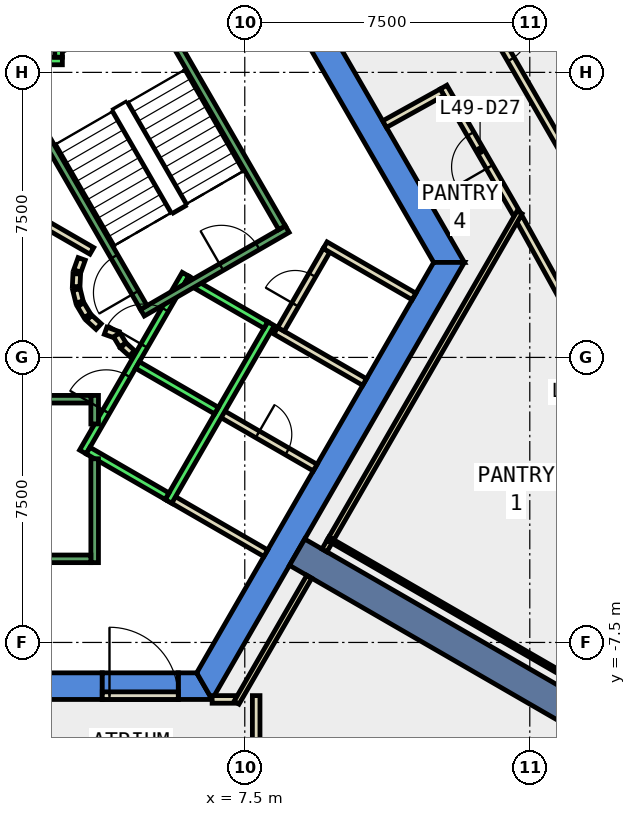
"""IFC4 building model, lengths in metres.
Left out: names, types, materials, properties, quantities, classifications, styles, units other than length and angle.
Written with IfcOpenShell. Run it as: python <this file> out.ifc"""

import sys

from ifc_helpers import new_model, si_unit, direction, frame, frame_2d, origin, place, context, subcontext, project, spatial, polyline, rectangle, outline, extrude, element, fill, save


model = new_model("IFC4")
c1 = context("Model", 3, precision=1e-05, world=origin(), true_north=direction((0.0, 1.0)))
c2 = subcontext(c1, "Body", "Model", "MODEL_VIEW")
j1 = project(units=[si_unit("LENGTHUNIT", "METRE"), si_unit("PLANEANGLEUNIT", "RADIAN")], contexts=[c1])
p1 = place(None, origin())
s1 = spatial("IfcSite", under=j1, at=p1, CompositionType="ELEMENT")
p2 = place(p1, origin())
s2 = spatial("IfcBuilding", under=s1, at=p2, CompositionType="ELEMENT")
p3 = place(p2, frame((0.0, 0.0, 219.2)))
s3 = spatial("IfcBuildingStorey", under=s2, at=p3, CompositionType="ELEMENT", Elevation=219.2)
p4 = place(p3, frame((0.0, 0.0, -0.4)))
e1 = element("IfcWall", 1, at=p4, inside=s3, PredefinedType="SHEAR", context=c2, shape_type="SweptSolid", body=[
    extrude(outline(polyline([(8.084, 11.498), (7.478, 11.148), (12.471, 2.5), (13.279, 2.5), (8.084, 11.498)])), origin(), (0.0, 0.0, 1.0), 4.2),
])
p5 = place(p3, frame((0.0, 0.0, -0.4)))
e2 = element("IfcWall", 2, at=p5, inside=s3, PredefinedType="SHEAR", context=c2, shape_type="SweptSolid", body=[
    extrude(outline(polyline([(3.75, -9.0), (3.75, -8.3), (-6.235, -8.3), (-6.64, -9.0), (3.75, -9.0)])), origin(), (0.0, 0.0, 1.0), 4.2),
])
p6 = place(p3, frame((0.0, 0.0, -0.4)))
e3 = element("IfcWall", 3, at=p6, inside=s3, PredefinedType="SHEAR", context=c2, shape_type="SweptSolid", body=[
    extrude(outline(polyline([(5.75, -8.3), (5.75, -9.0), (6.64, -9.0), (6.235, -8.3), (5.75, -8.3)])), origin(), (0.0, 0.0, 1.0), 4.2),
])
p7 = place(p3, frame((0.0, 0.0, 3.6)))
e4 = element("IfcWall", 4, at=p7, inside=s3, PredefinedType="SHEAR", context=c2, shape_type="SweptSolid", body=[
    extrude(outline(polyline([(5.75, -9.0), (5.75, -8.3), (3.75, -8.3), (3.75, -9.0), (5.75, -9.0)])), origin(), (0.0, 0.0, 1.0), 0.2),
])
p8 = place(p3, frame((0.0, 0.0, -0.4)))
e5 = element("IfcWall", 5, at=p8, inside=s3, PredefinedType="SHEAR", context=c2, shape_type="SweptSolid", body=[
    extrude(outline(polyline([(6.64, -9.0), (13.279, 2.5), (12.471, 2.5), (6.235, -8.3), (6.64, -9.0)])), origin(), (0.0, 0.0, 1.0), 4.2),
])
p9 = place(p3, frame((8.877, -5.125, -0.4), z_axis=(0.0, 0.0, 1.0), x_axis=(0.866017533419, -0.500013631625, 0.0)))
e6 = element("IfcWall", 6, at=p9, inside=s3, PredefinedType="SHEAR", context=c2, shape_type="SweptSolid", body=[
    extrude(rectangle(XDim=9.0, YDim=0.8, at=frame_2d((4.5, 0.0))), origin(), (0.0, 0.0, 1.0), 4.2),
])
p10 = place(p3, frame((14.652, 3.783, 0.0), z_axis=(0.0, 0.0, 1.0), x_axis=(-0.499821427992, 0.866128477837, 0.0)))
e7 = element("IfcWall", 7, at=p10, inside=s3, PredefinedType="PARTITIONING", context=c2, shape_type="SweptSolid", body=[
    extrude(rectangle(XDim=3.844, YDim=0.2, at=frame_2d((1.922, 0.0))), origin(), (0.0, 0.0, 1.0), 3.8),
])
p11 = place(p10, frame((1.421, 0.0, 0.0)))
e8 = element("IfcOpeningElement", 8, at=p11, cuts=e7, PredefinedType="OPENING", context=c2, shape_type="SweptSolid", body=[
    extrude(rectangle(XDim=1.0, YDim=2.1, at=frame_2d((0.5, 1.05))), frame((0.0, 0.11, 0.0), z_axis=(0.0, -1.0, 0.0), x_axis=(1.0, 0.0, 0.0)), (0.0, 0.0, 1.0), 0.22),
])
p12 = place(p3, frame((12.693, 6.976, 0.0), z_axis=(0.0, 0.0, 1.0), x_axis=(-0.874908151187, -0.484288887944, 0.0)))
e9 = element("IfcWall", 9, at=p12, inside=s3, PredefinedType="PARTITIONING", context=c2, shape_type="SweptSolid", body=[
    extrude(rectangle(XDim=1.731, YDim=0.2, at=frame_2d((0.865, 0.0))), origin(), (0.0, 0.0, 1.0), 3.8),
])
p13 = place(p3, frame((18.574, -3.303, 0.0), z_axis=(0.0, 0.0, 1.0), x_axis=(-0.484239190765, 0.874935658279, 0.0)))
e10 = element("IfcWall", 10, at=p13, inside=s3, PredefinedType="PARTITIONING", context=c2, shape_type="SweptSolid", body=[
    extrude(rectangle(XDim=7.963, YDim=0.2, at=frame_2d((3.981, 0.0))), origin(), (0.0, 0.0, 1.0), 3.8),
])
p14 = place(p13, frame((3.482, 0.0, 0.0)))
e11 = element("IfcOpeningElement", 11, at=p14, cuts=e10, PredefinedType="OPENING", context=c2, shape_type="SweptSolid", body=[
    extrude(rectangle(XDim=1.0, YDim=2.1, at=frame_2d((0.5, 1.05))), frame((0.0, 0.11, 0.0), z_axis=(0.0, -1.0, 0.0), x_axis=(1.0, 0.0, 0.0)), (0.0, 0.0, 1.0), 0.22),
])
p15 = place(p3, frame((12.202, 11.828, 0.0), z_axis=(0.0, 0.0, 1.0), x_axis=(0.499919823193, -0.866071688937, 0.0)))
e12 = element("IfcWall", 12, at=p15, inside=s3, PredefinedType="PARTITIONING", context=c2, shape_type="SweptSolid", body=[
    extrude(rectangle(XDim=8.209, YDim=0.2, at=frame_2d((4.104, 0.0))), origin(), (0.0, 0.0, 1.0), 3.8),
])
p16 = place(p15, frame((3.604, 0.0, 0.0)))
e13 = element("IfcOpeningElement", 13, at=p16, cuts=e12, PredefinedType="OPENING", context=c2, shape_type="SweptSolid", body=[
    extrude(rectangle(XDim=1.0, YDim=2.1, at=frame_2d((0.5, 1.05))), frame((0.0, 0.11, 0.0), z_axis=(0.0, -1.0, 0.0), x_axis=(1.0, 0.0, 0.0)), (0.0, 0.0, 1.0), 0.22),
])
p17 = place(p3, frame((8.053, -5.152, 0.0), z_axis=(0.0, 0.0, 1.0), x_axis=(-0.865808344015, 0.500375770231, 0.0)))
e14 = element("IfcWall", 14, at=p17, inside=s3, PredefinedType="PARTITIONING", context=c2, shape_type="SweptSolid", body=[
    extrude(rectangle(XDim=2.9, YDim=0.2, at=frame_2d((1.45, 0.0))), origin(), (0.0, 0.0, 1.0), 3.8),
])
p18 = place(p3, frame((6.841, -1.451, 0.0), z_axis=(0.0, 0.0, 1.0), x_axis=(0.866220623736, -0.499661716578, 0.0)))
e15 = element("IfcWall", 15, at=p18, inside=s3, PredefinedType="PARTITIONING", context=c2, shape_type="SweptSolid", body=[
    extrude(rectangle(XDim=2.9, YDim=0.2, at=frame_2d((1.45, 0.0))), origin(), (0.0, 0.0, 1.0), 3.8),
])
p19 = place(p18, frame((1.15, 0.0, 0.0)))
e16 = element("IfcOpeningElement", 16, at=p19, cuts=e15, PredefinedType="OPENING", context=c2, shape_type="SweptSolid", body=[
    extrude(rectangle(XDim=0.9, YDim=2.1, at=frame_2d((0.45, 1.05))), frame((0.0, 0.11, 0.0), z_axis=(0.0, -1.0, 0.0), x_axis=(1.0, 0.0, 0.0)), (0.0, 0.0, 1.0), 0.22),
])
p20 = place(p3, frame((10.653, -0.648, 0.0), z_axis=(0.0, 0.0, 1.0), x_axis=(-0.866036505625, 0.499980770555, 0.0)))
e17 = element("IfcWall", 17, at=p20, inside=s3, PredefinedType="PARTITIONING", context=c2, shape_type="SweptSolid", body=[
    extrude(rectangle(XDim=2.7, YDim=0.2, at=frame_2d((1.35, 0.0))), origin(), (0.0, 0.0, 1.0), 3.8),
])
p21 = place(p3, frame((8.451, 0.738, 0.0), z_axis=(0.0, 0.0, 1.0), x_axis=(0.499913221443, 0.866075499611, 0.0)))
e18 = element("IfcWall", 18, at=p21, inside=s3, PredefinedType="PARTITIONING", context=c2, shape_type="SweptSolid", body=[
    extrude(rectangle(XDim=2.4, YDim=0.2, at=frame_2d((1.2, 0.0))), origin(), (0.0, 0.0, 1.0), 3.8),
])
p22 = place(p21, frame((0.75, 0.0, 0.0)))
e19 = element("IfcOpeningElement", 19, at=p22, cuts=e18, PredefinedType="OPENING", context=c2, shape_type="SweptSolid", body=[
    extrude(rectangle(XDim=0.9, YDim=2.1, at=frame_2d((0.45, 1.05))), frame((0.0, 0.11, 0.0), z_axis=(0.0, -1.0, 0.0), x_axis=(1.0, 0.0, 0.0)), (0.0, 0.0, 1.0), 0.22),
])
p23 = place(p3, frame((9.615, 2.953, 0.0), z_axis=(0.0, 0.0, 1.0), x_axis=(0.866013897511, -0.50001992892, 0.0)))
e20 = element("IfcWall", 20, at=p23, inside=s3, PredefinedType="PARTITIONING", context=c2, shape_type="SweptSolid", body=[
    extrude(rectangle(XDim=2.7, YDim=0.2, at=frame_2d((1.35, 0.0))), origin(), (0.0, 0.0, 1.0), 3.8),
])
p24 = place(p3, frame((6.641, -8.999, 0.0), z_axis=(0.0, 0.0, 1.0), x_axis=(1.0, 0.0, 0.0)))
e21 = element("IfcWall", 21, at=p24, inside=s3, PredefinedType="PARTITIONING", context=c2, shape_type="SweptSolid", body=[
    extrude(rectangle(XDim=0.617, YDim=0.2, at=frame_2d((0.309, 0.0))), origin(), (0.0, 0.0, 1.0), 3.8),
])
p25 = place(p3, frame((7.283, -9.086, 0.0), z_axis=(0.0, 0.0, 1.0), x_axis=(0.500035303972, 0.866005020067, 0.0)))
e22 = element("IfcWall", 22, at=p25, inside=s3, PredefinedType="PARTITIONING", context=c2, shape_type="SweptSolid", body=[
    extrude(rectangle(XDim=3.828, YDim=0.15, at=frame_2d((1.914, 0.0))), origin(), (0.0, 0.0, 1.0), 3.8),
])
p26 = place(p3, frame((9.779, -4.762, 0.0), z_axis=(0.0, 0.0, 1.0), x_axis=(0.499990552429, 0.866030858274, 0.0)))
e23 = element("IfcWall", 23, at=p26, inside=s3, PredefinedType="PARTITIONING", context=c2, shape_type="SweptSolid", body=[
    extrude(rectangle(XDim=9.906, YDim=0.15, at=frame_2d((4.953, 0.0))), origin(), (0.0, 0.0, 1.0), 3.8),
])
p27 = place(p3, frame((1.866, 3.732, 0.0), z_axis=(0.0, 0.0, 1.0), x_axis=(0.866043361281, -0.499968895414, 0.0)))
e24 = element("IfcWall", 24, at=p27, inside=s3, PredefinedType="PARTITIONING", context=c2, shape_type="SweptSolid", body=[
    extrude(rectangle(XDim=1.858, YDim=0.2, at=frame_2d((0.929, 0.0))), origin(), (0.0, 0.0, 1.0), 3.8),
])
p28 = place(p3, frame((3.208, 2.592, 0.0), z_axis=(0.0, 0.0, 1.0), x_axis=(-0.337388820924, -0.941365382578, 0.0)))
e25 = element("IfcWall", 25, at=p28, inside=s3, PredefinedType="PARTITIONING", context=c2, shape_type="SweptSolid", body=[
    extrude(rectangle(XDim=0.338, YDim=0.2, at=frame_2d((0.169, 0.0))), origin(), (0.0, 0.0, 1.0), 3.8),
])
p29 = place(p3, frame((3.079, 2.199, 0.0), z_axis=(0.0, 0.0, 1.0), x_axis=(-0.047771483479, -0.998858290933, 0.0)))
e26 = element("IfcWall", 26, at=p29, inside=s3, PredefinedType="PARTITIONING", context=c2, shape_type="SweptSolid", body=[
    extrude(rectangle(XDim=0.337, YDim=0.2, at=frame_2d((0.169, 0.0))), origin(), (0.0, 0.0, 1.0), 3.8),
])
p30 = place(p3, frame((3.07, 1.786, 0.0), z_axis=(0.0, 0.0, 1.0), x_axis=(0.242705583207, -0.970099994784, 0.0)))
e27 = element("IfcWall", 27, at=p30, inside=s3, PredefinedType="PARTITIONING", context=c2, shape_type="SweptSolid", body=[
    extrude(rectangle(XDim=0.338, YDim=0.2, at=frame_2d((0.169, 0.0))), origin(), (0.0, 0.0, 1.0), 3.8),
])
for number, where, z_axis, x_axis in (
    (28, (3.182, 1.388, 0.0), (0.0, 0.0, 1.0), (0.512, -0.859, 0.0)),
    (29, (3.404, 1.039, 0.0), (0.0, 0.0, 1.0), (0.74, -0.672, 0.0)),
):
    element("IfcWall", number, at=place(p3, frame(where, z_axis=z_axis, x_axis=x_axis)), inside=s3, PredefinedType="PARTITIONING", context=c2, shape_type="SweptSolid", body=[
        extrude(rectangle(XDim=0.338, YDim=0.2, at=frame_2d((0.169, 0.0))), origin(), (0.0, 0.0, 1.0), 3.8),
    ])
p31 = place(p3, frame((3.838, 0.702, 0.0), z_axis=(0.0, 0.0, 1.0), x_axis=(0.941035081519, -0.338308993895, 0.0)))
e30 = element("IfcWall", 30, at=p31, inside=s3, PredefinedType="PARTITIONING", context=c2, shape_type="SweptSolid", body=[
    extrude(rectangle(XDim=0.337, YDim=0.2, at=frame_2d((0.168, 0.0))), origin(), (0.0, 0.0, 1.0), 3.8),
])
p32 = place(p3, frame((4.132, 0.593, 0.0), z_axis=(0.0, 0.0, 1.0), x_axis=(0.513561617048, -0.858052717201, 0.0)))
e31 = element("IfcWall", 31, at=p32, inside=s3, PredefinedType="PARTITIONING", context=c2, shape_type="SweptSolid", body=[
    extrude(rectangle(XDim=0.308, YDim=0.2, at=frame_2d((0.154, 0.0))), origin(), (0.0, 0.0, 1.0), 3.8),
])
p33 = place(p3, frame((4.301, 0.315, 0.0), z_axis=(0.0, 0.0, 1.0), x_axis=(0.741798017506, -0.670623367639, 0.0)))
e32 = element("IfcWall", 32, at=p33, inside=s3, PredefinedType="PARTITIONING", context=c2, shape_type="SweptSolid", body=[
    extrude(rectangle(XDim=0.309, YDim=0.2, at=frame_2d((0.154, 0.0))), origin(), (0.0, 0.0, 1.0), 3.8),
])
p34 = place(p3, frame((7.8, -8.899, 0.0), z_axis=(0.0, 0.0, 1.0), x_axis=(0.0, -1.0, 0.0)))
e33 = element("IfcWall", 33, at=p34, inside=s3, PredefinedType="PARTITIONING", context=c2, shape_type="SweptSolid", body=[
    extrude(rectangle(XDim=6.06, YDim=0.2, at=frame_2d((3.03, 0.0))), origin(), (0.0, 0.0, 1.0), 3.8),
])
p35 = place(p3, frame((9.689, -4.768, 0.0), z_axis=(0.0, 0.0, 1.0), x_axis=(0.866023322577, -0.500003604739, 0.0)))
e34 = element("IfcWall", 34, at=p35, inside=s3, PredefinedType="PARTITIONING", context=c2, shape_type="SweptSolid", body=[
    extrude(rectangle(XDim=11.15, YDim=0.1, at=frame_2d((5.575, 0.0))), origin(), (0.0, 0.0, 1.0), 3.8),
])
p36 = place(p3, frame((3.75, -8.9, 0.0), z_axis=(0.0, 0.0, 1.0), x_axis=(1.0, 0.0, 0.0)))
e35 = element("IfcWall", 35, at=p36, inside=s3, PredefinedType="PARTITIONING", context=c2, shape_type="SweptSolid", body=[
    extrude(rectangle(XDim=2.0, YDim=0.2, at=frame_2d((1.0, 0.0))), origin(), (0.0, 0.0, 1.0), 2.4),
])
p37 = place(p36, frame((0.19, 0.0, 0.0)))
e36 = element("IfcOpeningElement", 36, at=p37, cuts=e35, PredefinedType="OPENING", context=c2, shape_type="SweptSolid", body=[
    extrude(rectangle(XDim=1.8, YDim=2.1, at=frame_2d((0.9, 1.05))), frame((0.0, 0.11, 0.0), z_axis=(0.0, -1.0, 0.0), x_axis=(1.0, 0.0, 0.0)), (0.0, 0.0, 1.0), 0.22),
])
p38 = place(p3, frame((9.596, -5.079, 0.0), z_axis=(0.0, 0.0, 1.0), x_axis=(0.500782702656, 0.865573038351, 0.0)))
e37 = element("IfcWall", 37, at=p38, inside=s3, PredefinedType="PARTITIONING", context=c2, shape_type="SweptSolid", body=[
    extrude(rectangle(XDim=0.266, YDim=0.15, at=frame_2d((0.133, 0.0))), origin(), (0.0, 0.0, 1.0), 3.8),
])
p39 = place(p3, frame((2.7, 7.8, 0.0), z_axis=(0.0, 0.0, 1.0), x_axis=(-1.0, 0.0, 0.0)))
e38 = element("IfcWall", 38, at=p39, inside=s3, PredefinedType="STANDARD", context=c2, shape_type="SweptSolid", body=[
    extrude(rectangle(XDim=5.4, YDim=0.2, at=frame_2d((2.7, 0.0))), origin(), (0.0, 0.0, 1.0), 3.8),
])
p40 = place(p39, frame((1.225, 0.0, 0.0)))
e39 = element("IfcOpeningElement", 39, at=p40, cuts=e38, PredefinedType="OPENING", context=c2, shape_type="SweptSolid", body=[
    extrude(rectangle(XDim=1.1, YDim=2.1, at=frame_2d((0.55, 1.05))), frame((0.0, 0.11, 0.0), z_axis=(0.0, -1.0, 0.0), x_axis=(1.0, 0.0, 0.0)), (0.0, 0.0, 1.0), 0.22),
])
p41 = place(p39, frame((3.075, 0.0, 0.0)))
e40 = element("IfcOpeningElement", 40, at=p41, cuts=e38, PredefinedType="OPENING", context=c2, shape_type="SweptSolid", body=[
    extrude(rectangle(XDim=1.1, YDim=2.1, at=frame_2d((0.55, 1.05))), frame((0.0, 0.11, 0.0), z_axis=(0.0, -1.0, 0.0), x_axis=(1.0, 0.0, 0.0)), (0.0, 0.0, 1.0), 0.22),
])
p42 = place(p3, frame((2.6, 7.9, 0.0), z_axis=(0.0, 0.0, 1.0), x_axis=(0.0, 1.0, 0.0)))
e41 = element("IfcWall", 41, at=p42, inside=s3, PredefinedType="STANDARD", context=c2, shape_type="SweptSolid", body=[
    extrude(rectangle(XDim=2.4, YDim=0.2, at=frame_2d((1.2, 0.0))), origin(), (0.0, 0.0, 1.0), 3.8),
])
p43 = place(p3, frame((3.24, -2.488, 0.0), z_axis=(0.0, 0.0, 1.0), x_axis=(0.500034260056, 0.866005622828, 0.0)))
e42 = element("IfcWall", 42, at=p43, inside=s3, PredefinedType="STANDARD", context=c2, shape_type="SweptSolid", body=[
    extrude(rectangle(XDim=5.399, YDim=0.2, at=frame_2d((2.7, 0.0))), origin(), (0.0, 0.0, 1.0), 3.8),
])
p44 = place(p43, frame((3.225, 0.0, 0.0)))
e43 = element("IfcOpeningElement", 43, at=p44, cuts=e42, PredefinedType="OPENING", context=c2, shape_type="SweptSolid", body=[
    extrude(rectangle(XDim=1.1, YDim=2.1, at=frame_2d((0.55, 1.05))), frame((0.0, 0.11, 0.0), z_axis=(0.0, -1.0, 0.0), x_axis=(1.0, 0.0, 0.0)), (0.0, 0.0, 1.0), 0.22),
])
p45 = place(p43, frame((1.225, 0.0, 0.0)))
e44 = element("IfcOpeningElement", 44, at=p45, cuts=e42, PredefinedType="OPENING", context=c2, shape_type="SweptSolid", body=[
    extrude(rectangle(XDim=1.1, YDim=2.1, at=frame_2d((0.55, 1.05))), frame((0.0, 0.11, 0.0), z_axis=(0.0, -1.0, 0.0), x_axis=(1.0, 0.0, 0.0)), (0.0, 0.0, 1.0), 0.22),
])
p46 = place(p3, frame((5.492, -3.788, 0.0), z_axis=(0.0, 0.0, 1.0), x_axis=(0.500034260056, 0.866005622828, 0.0)))
e45 = element("IfcWall", 45, at=p46, inside=s3, PredefinedType="STANDARD", context=c2, shape_type="SweptSolid", body=[
    extrude(rectangle(XDim=5.399, YDim=0.2, at=frame_2d((2.7, 0.0))), origin(), (0.0, 0.0, 1.0), 3.8),
])
p47 = place(p3, frame((3.377, -2.452, 0.0), z_axis=(0.0, 0.0, 1.0), x_axis=(0.865955154139, -0.50012165622, 0.0)))
e46 = element("IfcWall", 46, at=p47, inside=s3, PredefinedType="STANDARD", context=c2, shape_type="SweptSolid", body=[
    extrude(rectangle(XDim=2.4, YDim=0.2, at=frame_2d((1.2, 0.0))), origin(), (0.0, 0.0, 1.0), 3.8),
])
for number, where, z_axis, x_axis in (
    (47, (4.677, -0.2, 0.0), (0.0, 0.0, 1.0), (0.866, -0.5, 0.0)),
    (48, (5.977, 2.052, 0.0), (0.0, 0.0, 1.0), (0.866, -0.5, 0.0)),
):
    element("IfcWall", number, at=place(p3, frame(where, z_axis=z_axis, x_axis=x_axis)), inside=s3, PredefinedType="STANDARD", context=c2, shape_type="SweptSolid", body=[
        extrude(rectangle(XDim=2.399, YDim=0.2, at=frame_2d((1.2, 0.0))), origin(), (0.0, 0.0, 1.0), 3.8),
    ])
p48 = place(p3, frame((3.55, -2.667, 0.0), z_axis=(0.0, 0.0, 1.0), x_axis=(0.0, -1.0, 0.0)))
e49 = element("IfcWall", 49, at=p48, inside=s3, PredefinedType="STANDARD", context=c2, shape_type="SweptSolid", body=[
    extrude(rectangle(XDim=2.733, YDim=0.2, at=frame_2d((1.366, 0.0))), origin(), (0.0, 0.0, 1.0), 3.8),
])
p49 = place(p3, frame((3.55, -1.0, 0.0), z_axis=(0.0, 0.0, 1.0), x_axis=(0.0, -1.0, 0.0)))
e50 = element("IfcWall", 50, at=p49, inside=s3, PredefinedType="STANDARD", context=c2, shape_type="SweptSolid", body=[
    extrude(rectangle(XDim=0.751, YDim=0.2, at=frame_2d((0.375, 0.0))), origin(), (0.0, 0.0, 1.0), 3.8),
])
p50 = place(p3, frame((-3.45, -1.1, 0.0), z_axis=(0.0, 0.0, 1.0), x_axis=(1.0, 0.0, 0.0)))
e51 = element("IfcWall", 51, at=p50, inside=s3, PredefinedType="STANDARD", context=c2, shape_type="SweptSolid", body=[
    extrude(rectangle(XDim=6.9, YDim=0.2, at=frame_2d((3.45, 0.0))), origin(), (0.0, 0.0, 1.0), 3.8),
])
p51 = place(p50, frame((0.45, 0.0, 0.0)))
e52 = element("IfcOpeningElement", 52, at=p51, cuts=e51, PredefinedType="OPENING", context=c2, shape_type="SweptSolid", body=[
    extrude(rectangle(XDim=1.1, YDim=2.2, at=frame_2d((0.55, 1.1))), frame((0.0, 0.11, 0.0), z_axis=(0.0, -1.0, 0.0), x_axis=(1.0, 0.0, 0.0)), (0.0, 0.0, 1.0), 0.22),
])
p52 = place(p3, frame((-3.45, -5.3, 0.0), z_axis=(0.0, 0.0, 1.0), x_axis=(1.0, 0.0, 0.0)))
e53 = element("IfcWall", 53, at=p52, inside=s3, PredefinedType="STANDARD", context=c2, shape_type="SweptSolid", body=[
    extrude(rectangle(XDim=6.9, YDim=0.2, at=frame_2d((3.45, 0.0))), origin(), (0.0, 0.0, 1.0), 3.8),
])
p53 = place(p3, frame((4.806, 1.176, 0.0), z_axis=(0.0, 0.0, 1.0), x_axis=(0.866059941101, 0.499940174841, 0.0)))
e54 = element("IfcWall", 54, at=p53, inside=s3, PredefinedType="STANDARD", context=c2, shape_type="SweptSolid", body=[
    extrude(rectangle(XDim=4.4, YDim=0.2, at=frame_2d((2.2, 0.0))), origin(), (0.0, 0.0, 1.0), 3.8),
])
p54 = place(p53, frame((2.4, 0.0, 0.0)))
e55 = element("IfcOpeningElement", 55, at=p54, cuts=e54, PredefinedType="OPENING", context=c2, shape_type="SweptSolid", body=[
    extrude(rectangle(XDim=1.1, YDim=2.2, at=frame_2d((0.55, 1.1))), frame((0.0, 0.11, 0.0), z_axis=(0.0, -1.0, 0.0), x_axis=(1.0, 0.0, 0.0)), (0.0, 0.0, 1.0), 0.22),
])
p55 = place(p3, frame((4.843, 1.312, 0.0), z_axis=(0.0, 0.0, 1.0), x_axis=(-0.499963383562, 0.866046543262, 0.0)))
e56 = element("IfcWall", 56, at=p55, inside=s3, PredefinedType="STANDARD", context=c2, shape_type="SweptSolid", body=[
    extrude(rectangle(XDim=6.9, YDim=0.2, at=frame_2d((3.45, 0.0))), origin(), (0.0, 0.0, 1.0), 3.8),
])
p56 = place(p55, frame((0.45, 0.0, 0.0)))
e57 = element("IfcOpeningElement", 57, at=p56, cuts=e56, PredefinedType="OPENING", context=c2, shape_type="SweptSolid", body=[
    extrude(rectangle(XDim=1.1, YDim=2.2, at=frame_2d((0.55, 1.1))), frame((0.0, 0.11, 0.0), z_axis=(0.0, -1.0, 0.0), x_axis=(1.0, 0.0, 0.0)), (0.0, 0.0, 1.0), 0.22),
])
p57 = place(p3, frame((8.48, 3.412, 0.0), z_axis=(0.0, 0.0, 1.0), x_axis=(-0.499978703459, 0.866037698999, 0.0)))
e58 = element("IfcWall", 58, at=p57, inside=s3, PredefinedType="STANDARD", context=c2, shape_type="SweptSolid", body=[
    extrude(rectangle(XDim=6.9, YDim=0.2, at=frame_2d((3.45, 0.0))), origin(), (0.0, 0.0, 1.0), 3.8),
])
p58 = place(p16, origin())
e59 = element("IfcDoor", 59, at=p58, inside=s3, OperationType="SINGLE_SWING_RIGHT", PredefinedType="DOOR", context=c2, shape_type="SweptSolid", body=[
    extrude(rectangle(XDim=1.0, YDim=2.1, at=frame_2d((0.5, 1.05))), frame((0.0, 0.025, 0.0), z_axis=(0.0, -1.0, 0.0), x_axis=(1.0, 0.0, 0.0)), (0.0, 0.0, 1.0), 0.05),
])
fill(e13, e59)
p59 = place(p11, origin())
e60 = element("IfcDoor", 60, at=p59, inside=s3, OperationType="SINGLE_SWING_LEFT", PredefinedType="DOOR", context=c2, shape_type="SweptSolid", body=[
    extrude(rectangle(XDim=1.0, YDim=2.1, at=frame_2d((0.5, 1.05))), frame((0.0, 0.025, 0.0), z_axis=(0.0, -1.0, 0.0), x_axis=(1.0, 0.0, 0.0)), (0.0, 0.0, 1.0), 0.05),
])
fill(e8, e60)
p60 = place(p19, origin())
e61 = element("IfcDoor", 61, at=p60, inside=s3, OperationType="SINGLE_SWING_LEFT", PredefinedType="DOOR", context=c2, shape_type="SweptSolid", body=[
    extrude(rectangle(XDim=0.9, YDim=2.1, at=frame_2d((0.45, 1.05))), frame((0.0, 0.025, 0.0), z_axis=(0.0, -1.0, 0.0), x_axis=(1.0, 0.0, 0.0)), (0.0, 0.0, 1.0), 0.05),
])
fill(e16, e61)
p61 = place(p22, origin())
e62 = element("IfcDoor", 62, at=p61, inside=s3, OperationType="SINGLE_SWING_LEFT", PredefinedType="DOOR", context=c2, shape_type="SweptSolid", body=[
    extrude(rectangle(XDim=0.9, YDim=2.1, at=frame_2d((0.45, 1.05))), frame((0.0, 0.025, 0.0), z_axis=(0.0, -1.0, 0.0), x_axis=(1.0, 0.0, 0.0)), (0.0, 0.0, 1.0), 0.05),
])
fill(e19, e62)
p62 = place(p37, origin())
e63 = element("IfcDoor", 63, at=p62, inside=s3, OperationType="DOUBLE_DOOR_SINGLE_SWING", PredefinedType="DOOR", context=c2, shape_type="SweptSolid", body=[
    extrude(rectangle(XDim=1.8, YDim=2.1, at=frame_2d((0.9, 1.05))), frame((0.0, 0.025, 0.0), z_axis=(0.0, -1.0, 0.0), x_axis=(1.0, 0.0, 0.0)), (0.0, 0.0, 1.0), 0.05),
])
fill(e36, e63)
p63 = place(p44, origin())
e64 = element("IfcDoor", 64, at=p63, inside=s3, OperationType="SLIDING_TO_LEFT", PredefinedType="DOOR", context=c2, shape_type="SweptSolid", body=[
    extrude(rectangle(XDim=1.1, YDim=2.1, at=frame_2d((0.55, 1.05))), frame((0.0, 0.025, 0.0), z_axis=(0.0, -1.0, 0.0), x_axis=(1.0, 0.0, 0.0)), (0.0, 0.0, 1.0), 0.05),
])
fill(e43, e64)
p64 = place(p45, origin())
e65 = element("IfcDoor", 65, at=p64, inside=s3, OperationType="SLIDING_TO_LEFT", PredefinedType="DOOR", context=c2, shape_type="SweptSolid", body=[
    extrude(rectangle(XDim=1.1, YDim=2.1, at=frame_2d((0.55, 1.05))), frame((0.0, 0.025, 0.0), z_axis=(0.0, -1.0, 0.0), x_axis=(1.0, 0.0, 0.0)), (0.0, 0.0, 1.0), 0.05),
])
fill(e44, e65)
p65 = place(p56, origin())
e66 = element("IfcDoor", 66, at=p65, inside=s3, OperationType="SINGLE_SWING_LEFT", PredefinedType="DOOR", context=c2, shape_type="SweptSolid", body=[
    extrude(rectangle(XDim=1.1, YDim=2.2, at=frame_2d((0.55, 1.1))), frame((0.0, 0.025, 0.0), z_axis=(0.0, -1.0, 0.0), x_axis=(1.0, 0.0, 0.0)), (0.0, 0.0, 1.0), 0.05),
])
fill(e57, e66)
p66 = place(p54, origin())
e67 = element("IfcDoor", 67, at=p66, inside=s3, OperationType="SINGLE_SWING_LEFT", PredefinedType="DOOR", context=c2, shape_type="SweptSolid", body=[
    extrude(rectangle(XDim=1.1, YDim=2.2, at=frame_2d((0.55, 1.1))), frame((0.0, 0.025, 0.0), z_axis=(0.0, -1.0, 0.0), x_axis=(1.0, 0.0, 0.0)), (0.0, 0.0, 1.0), 0.05),
])
fill(e55, e67)
save(model, sys.argv[1])
